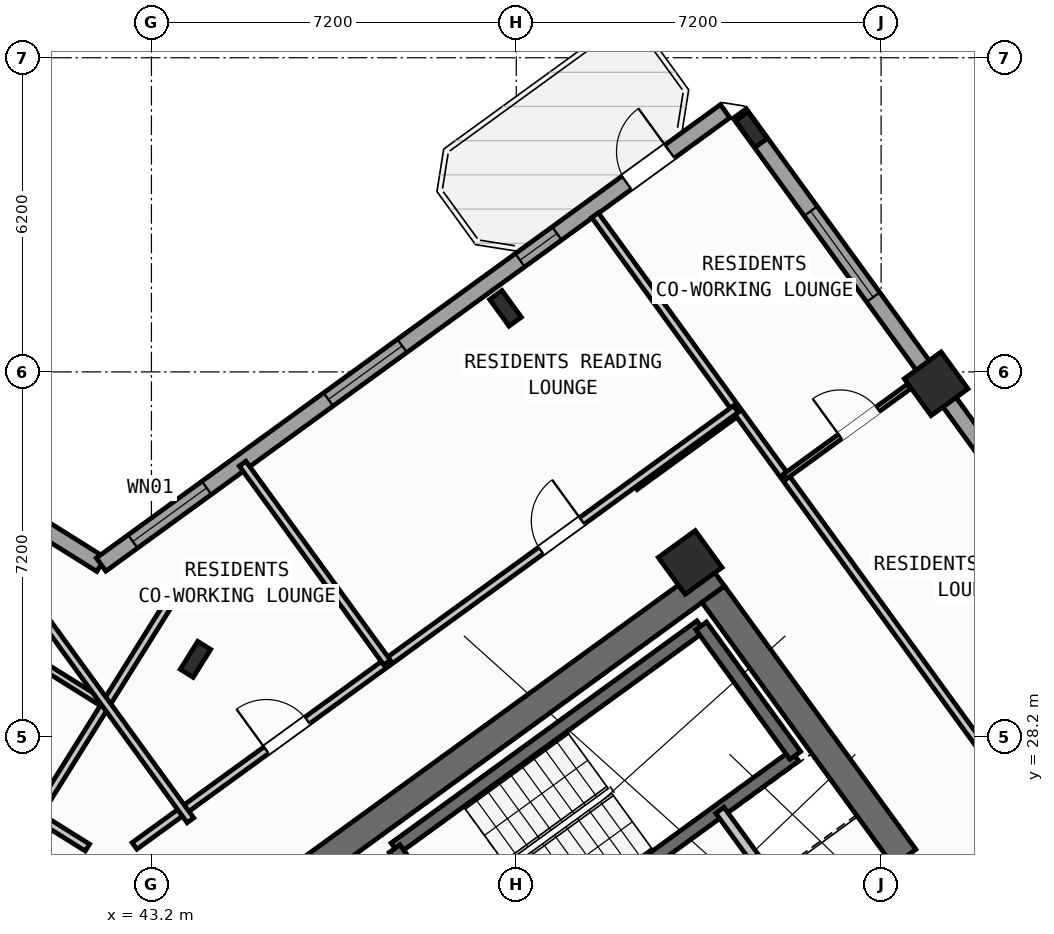
"""IFC4 building model, lengths in metres.
Left out: names, types, materials, properties, quantities, classifications, styles, units other than length and angle.
Written with IfcOpenShell. Run it as: python <this file> out.ifc"""

import sys

from ifc_helpers import new_model, si_unit, direction, frame, frame_2d, origin, origin_2d, place, context, subcontext, project, spatial, rectangle, hollow_rectangle, i_section, extrude, source, transform, mapped, element, fill, save


model = new_model("IFC4")
c1 = context("Model", 3, precision=1e-05, world=origin(), true_north=direction((0.0, 1.0)))
c2 = subcontext(c1, "Body", "Model", "MODEL_VIEW")
j1 = project(units=[si_unit("LENGTHUNIT", "METRE"), si_unit("PLANEANGLEUNIT", "RADIAN")], contexts=[c1])
p1 = place(None, origin())
s1 = spatial("IfcSite", under=j1, at=p1, CompositionType="ELEMENT")
p2 = place(p1, origin())
s2 = spatial("IfcBuilding", under=s1, at=p2, CompositionType="ELEMENT")
p3 = place(p2, frame((0.0, 0.0, 112.5)))
s3 = spatial("IfcBuildingStorey", under=s2, at=p3, CompositionType="ELEMENT", Elevation=112.5)
p4 = place(p3, frame((44.365, 24.142, 0.0), z_axis=(0.0, 0.0, 1.0), x_axis=(0.809024304885, 0.587775190107, 0.0)))
e1 = element("IfcWall", 1, at=p4, inside=s3, PredefinedType="SHEAR", context=c2, shape_type="SweptSolid", body=[
    extrude(rectangle(XDim=12.34, YDim=0.55, at=frame_2d((6.17, 0.0))), origin(), (0.0, 0.0, 1.0), 3.35),
])
p5 = place(p3, frame((58.064, 25.813, 0.0), z_axis=(0.0, 0.0, 1.0), x_axis=(-0.587764933797, 0.809031756236, 0.0)))
e2 = element("IfcWall", 2, at=p5, inside=s3, PredefinedType="SHEAR", context=c2, shape_type="SweptSolid", body=[
    extrude(rectangle(XDim=6.425, YDim=0.55, at=frame_2d((3.212, 0.0))), origin(), (0.0, 0.0, 1.0), 3.35),
])
m1 = source(origin(), c2, "Body", "SweptSolid", [
    extrude(i_section(OverallWidth=0.3, OverallDepth=0.65, WebThickness=0.016, FlangeThickness=0.031, at=origin_2d()), origin(), (0.0, 0.0, 1.0), 3.6),
])
p6 = place(p3, frame((44.068, 29.726, 0.0), z_axis=(0.0, 0.0, 1.0), x_axis=(-0.848048096156, 0.529919264233, 0.0)))
e3 = element("IfcColumn", 3, at=p6, inside=s3, PredefinedType="COLUMN", context=c2, shape_type="MappedRepresentation", body=[
    mapped(m1, transform((0.0, 0.0, 0.0), scale=1.0)),
])
m2 = source(origin(), c2, "Body", "SweptSolid", [
    extrude(hollow_rectangle(XDim=0.9, YDim=0.9, WallThickness=0.036, at=origin_2d()), origin(), (0.0, 0.0, 1.0), 3.6),
])
p7 = place(p3, frame((53.832, 31.638, 0.0), z_axis=(0.0, 0.0, 1.0), x_axis=(0.809016994375, 0.587785252292, 0.0)))
e4 = element("IfcColumn", 4, at=p7, inside=s3, PredefinedType="COLUMN", context=c2, shape_type="MappedRepresentation", body=[
    mapped(m2, transform((0.0, 0.0, 0.0), scale=1.0)),
])
p8 = place(p3, frame((50.188, 36.654, 0.0), z_axis=(0.0, 0.0, 1.0), x_axis=(0.809016994375, 0.587785252292, 0.0)))
e5 = element("IfcColumn", 5, at=p8, inside=s3, PredefinedType="COLUMN", context=c2, shape_type="MappedRepresentation", body=[
    mapped(m1, transform((0.0, 0.0, 0.0), scale=1.0)),
])
p9 = place(p3, frame((58.686, 35.165, 0.0), z_axis=(0.0, 0.0, 1.0), x_axis=(0.809016994375, 0.587785252292, 0.0)))
e6 = element("IfcColumn", 6, at=p9, inside=s3, PredefinedType="COLUMN", context=c2, shape_type="MappedRepresentation", body=[
    mapped(m2, transform((0.0, 0.0, 0.0), scale=1.0)),
])
p10 = place(p3, frame((55.042, 40.181, 0.0), z_axis=(0.0, 0.0, 1.0), x_axis=(0.809016994375, 0.587785252292, 0.0)))
e7 = element("IfcColumn", 7, at=p10, inside=s3, PredefinedType="COLUMN", context=c2, shape_type="MappedRepresentation", body=[
    mapped(m1, transform((0.0, 0.0, 0.0), scale=1.0)),
])
p11 = place(p3, frame((17.424, 47.083, 0.0), z_axis=(0.0, 0.0, 1.0), x_axis=(0.848049927979, -0.529916332693, 0.0)))
e8 = element("IfcWall", 8, at=p11, inside=s3, PredefinedType="STANDARD", context=c2, shape_type="SweptSolid", body=[
    extrude(rectangle(XDim=29.223, YDim=0.32, at=frame_2d((14.612, 0.0))), origin(), (0.0, 0.0, 1.0), 3.35),
])
p12 = place(p11, frame((3.77, 0.0, 0.0)))
e9 = element("IfcOpeningElement", 9, at=p12, cuts=e8, PredefinedType="OPENING", context=c2, shape_type="SweptSolid", body=[
    extrude(rectangle(XDim=1.05, YDim=2.15, at=frame_2d((0.525, 1.075))), frame((0.0, 0.17, 0.0), z_axis=(0.0, -1.0, 0.0), x_axis=(1.0, 0.0, 0.0)), (0.0, 0.0, 1.0), 0.34),
])
p13 = place(p11, frame((0.9, 0.0, 0.8)))
e10 = element("IfcOpeningElement", 10, at=p13, cuts=e8, PredefinedType="OPENING", context=c2, shape_type="SweptSolid", body=[
    extrude(rectangle(XDim=2.1, YDim=1.55, at=frame_2d((1.05, 0.775))), frame((0.0, 0.17, 0.0), z_axis=(0.0, -1.0, 0.0), x_axis=(1.0, 0.0, 0.0)), (0.0, 0.0, 1.0), 0.34),
])
p14 = place(p11, frame((6.972, 0.0, 1.0)))
e11 = element("IfcOpeningElement", 11, at=p14, cuts=e8, PredefinedType="OPENING", context=c2, shape_type="SweptSolid", body=[
    extrude(rectangle(XDim=0.9, YDim=1.25, at=frame_2d((0.45, 0.625))), frame((0.0, 0.17, 0.0), z_axis=(0.0, -1.0, 0.0), x_axis=(1.0, 0.0, 0.0)), (0.0, 0.0, 1.0), 0.34),
])
p15 = place(p11, frame((9.847, 0.0, 0.85)))
e12 = element("IfcOpeningElement", 12, at=p15, cuts=e8, PredefinedType="OPENING", context=c2, shape_type="SweptSolid", body=[
    extrude(rectangle(XDim=1.5, YDim=1.5, at=frame_2d((0.75, 0.75))), frame((0.0, 0.17, 0.0), z_axis=(0.0, -1.0, 0.0), x_axis=(1.0, 0.0, 0.0)), (0.0, 0.0, 1.0), 0.34),
])
p16 = place(p11, frame((13.889, 0.0, 0.95)))
e13 = element("IfcOpeningElement", 13, at=p16, cuts=e8, PredefinedType="OPENING", context=c2, shape_type="SweptSolid", body=[
    extrude(rectangle(XDim=1.2, YDim=1.4, at=frame_2d((0.6, 0.7))), frame((0.0, 0.17, 0.0), z_axis=(0.0, -1.0, 0.0), x_axis=(1.0, 0.0, 0.0)), (0.0, 0.0, 1.0), 0.34),
])
p17 = place(p11, frame((17.254, 0.0, 1.0)))
e14 = element("IfcOpeningElement", 14, at=p17, cuts=e8, PredefinedType="OPENING", context=c2, shape_type="SweptSolid", body=[
    extrude(rectangle(XDim=0.9, YDim=1.25, at=frame_2d((0.45, 0.625))), frame((0.0, 0.17, 0.0), z_axis=(0.0, -1.0, 0.0), x_axis=(1.0, 0.0, 0.0)), (0.0, 0.0, 1.0), 0.34),
])
p18 = place(p11, frame((20.764, 0.0, 0.8)))
e15 = element("IfcOpeningElement", 15, at=p18, cuts=e8, PredefinedType="OPENING", context=c2, shape_type="SweptSolid", body=[
    extrude(rectangle(XDim=2.1, YDim=1.55, at=frame_2d((1.05, 0.775))), frame((0.0, 0.17, 0.0), z_axis=(0.0, -1.0, 0.0), x_axis=(1.0, 0.0, 0.0)), (0.0, 0.0, 1.0), 0.34),
])
p19 = place(p11, frame((25.403, 0.0, 0.8)))
e16 = element("IfcOpeningElement", 16, at=p19, cuts=e8, PredefinedType="OPENING", context=c2, shape_type="SweptSolid", body=[
    extrude(rectangle(XDim=2.1, YDim=1.55, at=frame_2d((1.05, 0.775))), frame((0.0, 0.17, 0.0), z_axis=(0.0, -1.0, 0.0), x_axis=(1.0, 0.0, 0.0)), (0.0, 0.0, 1.0), 0.34),
])
p20 = place(p3, frame((42.207, 31.597, 0.0), z_axis=(0.0, 0.0, 1.0), x_axis=(0.809020333377, 0.587780656523, 0.0)))
e17 = element("IfcWall", 17, at=p20, inside=s3, PredefinedType="STANDARD", context=c2, shape_type="SweptSolid", body=[
    extrude(rectangle(XDim=15.223, YDim=0.32, at=frame_2d((7.611, 0.0))), origin(), (0.0, 0.0, 1.0), 3.35),
])
p21 = place(p20, frame((12.82, 0.0, 0.0)))
e18 = element("IfcOpeningElement", 18, at=p21, cuts=e17, PredefinedType="OPENING", context=c2, shape_type="SweptSolid", body=[
    extrude(rectangle(XDim=1.05, YDim=2.15, at=frame_2d((0.525, 1.075))), frame((0.0, 0.17, 0.0), z_axis=(0.0, -1.0, 0.0), x_axis=(1.0, 0.0, 0.0)), (0.0, 0.0, 1.0), 0.34),
])
p22 = place(p20, frame((0.775, 0.0, 0.85)))
e19 = element("IfcOpeningElement", 19, at=p22, cuts=e17, PredefinedType="OPENING", context=c2, shape_type="SweptSolid", body=[
    extrude(rectangle(XDim=1.8, YDim=1.5, at=frame_2d((0.9, 0.75))), frame((0.0, 0.17, 0.0), z_axis=(0.0, -1.0, 0.0), x_axis=(1.0, 0.0, 0.0)), (0.0, 0.0, 1.0), 0.34),
])
p23 = place(p20, frame((5.544, 0.0, 0.85)))
e20 = element("IfcOpeningElement", 20, at=p23, cuts=e17, PredefinedType="OPENING", context=c2, shape_type="SweptSolid", body=[
    extrude(rectangle(XDim=1.8, YDim=1.5, at=frame_2d((0.9, 0.75))), frame((0.0, 0.17, 0.0), z_axis=(0.0, -1.0, 0.0), x_axis=(1.0, 0.0, 0.0)), (0.0, 0.0, 1.0), 0.34),
])
p24 = place(p20, frame((10.219, 0.0, 1.0)))
e21 = element("IfcOpeningElement", 21, at=p24, cuts=e17, PredefinedType="OPENING", context=c2, shape_type="SweptSolid", body=[
    extrude(rectangle(XDim=0.9, YDim=1.25, at=frame_2d((0.45, 0.625))), frame((0.0, 0.17, 0.0), z_axis=(0.0, -1.0, 0.0), x_axis=(1.0, 0.0, 0.0)), (0.0, 0.0, 1.0), 0.34),
])
p25 = place(p3, frame((54.81, 40.5, 0.0), z_axis=(0.0, 0.0, 1.0), x_axis=(0.587783625747, -0.809018176127, 0.0)))
e22 = element("IfcWall", 22, at=p25, inside=s3, PredefinedType="STANDARD", context=c2, shape_type="SweptSolid", body=[
    extrude(rectangle(XDim=21.587, YDim=0.32, at=frame_2d((10.794, 0.0))), origin(), (0.0, 0.0, 1.0), 2.775),
])
p26 = place(p25, frame((2.381, 0.0, 0.8)))
e23 = element("IfcOpeningElement", 23, at=p26, cuts=e22, PredefinedType="OPENING", context=c2, shape_type="SweptSolid", body=[
    extrude(rectangle(XDim=2.1, YDim=1.55, at=frame_2d((1.05, 0.775))), frame((0.0, 0.17, 0.0), z_axis=(0.0, -1.0, 0.0), x_axis=(1.0, 0.0, 0.0)), (0.0, 0.0, 1.0), 0.34),
])
p27 = place(p25, frame((9.344, 0.0, 0.85)))
e24 = element("IfcOpeningElement", 24, at=p27, cuts=e22, PredefinedType="OPENING", context=c2, shape_type="SweptSolid", body=[
    extrude(rectangle(XDim=1.8, YDim=1.5, at=frame_2d((0.9, 0.75))), frame((0.0, 0.17, 0.0), z_axis=(0.0, -1.0, 0.0), x_axis=(1.0, 0.0, 0.0)), (0.0, 0.0, 1.0), 0.34),
])
p28 = place(p25, frame((19.234, 0.0, 1.0)))
e25 = element("IfcOpeningElement", 25, at=p28, cuts=e22, PredefinedType="OPENING", context=c2, shape_type="SweptSolid", body=[
    extrude(rectangle(XDim=0.9, YDim=1.25, at=frame_2d((0.45, 0.625))), frame((0.0, 0.17, 0.0), z_axis=(0.0, -1.0, 0.0), x_axis=(1.0, 0.0, 0.0)), (0.0, 0.0, 1.0), 0.34),
])
p29 = place(p3, frame((48.006, 25.996, 0.0), z_axis=(0.0, 0.0, 1.0), x_axis=(0.80901903764, 0.587782439969, 0.0)))
e26 = element("IfcWall", 26, at=p29, inside=s3, PredefinedType="SHEAR", context=c2, shape_type="SweptSolid", body=[
    extrude(rectangle(XDim=7.46, YDim=0.26, at=frame_2d((3.73, 0.0))), origin(), (0.0, 0.0, 1.0), 3.35),
])
p30 = place(p3, frame((49.863, 23.44, 0.0), z_axis=(0.0, 0.0, 1.0), x_axis=(0.809003474932, 0.587803859759, 0.0)))
e27 = element("IfcWall", 27, at=p30, inside=s3, PredefinedType="SHEAR", context=c2, shape_type="SweptSolid", body=[
    extrude(rectangle(XDim=7.46, YDim=0.26, at=frame_2d((3.73, 0.0))), origin(), (0.0, 0.0, 1.0), 3.35),
])
p31 = place(p30, frame((0.36, 0.0, 0.0)))
e28 = element("IfcOpeningElement", 28, at=p31, cuts=e27, PredefinedType="OPENING", context=c2, shape_type="SweptSolid", body=[
    extrude(rectangle(XDim=0.86, YDim=2.05, at=frame_2d((0.43, 1.025))), frame((0.0, 0.14, 0.0), z_axis=(0.0, -1.0, 0.0), x_axis=(1.0, 0.0, 0.0)), (0.0, 0.0, 1.0), 0.28),
])
p32 = place(p3, frame((49.855, 23.434, 0.0), z_axis=(0.0, 0.0, 1.0), x_axis=(-0.58776738483, 0.809029975545, 0.0)))
e29 = element("IfcWall", 29, at=p32, inside=s3, PredefinedType="SHEAR", context=c2, shape_type="SweptSolid", body=[
    extrude(rectangle(XDim=3.16, YDim=0.26, at=frame_2d((1.58, 0.0))), origin(), (0.0, 0.0, 1.0), 3.35),
])
p33 = place(p3, frame((55.906, 27.831, 0.0), z_axis=(0.0, 0.0, 1.0), x_axis=(-0.587804123638, 0.809003283204, 0.0)))
e30 = element("IfcWall", 30, at=p33, inside=s3, PredefinedType="SHEAR", context=c2, shape_type="SweptSolid", body=[
    extrude(rectangle(XDim=3.16, YDim=0.26, at=frame_2d((1.58, 0.0))), origin(), (0.0, 0.0, 1.0), 3.35),
])
p34 = place(p3, frame((56.111, 24.419, 0.0), z_axis=(0.0, 0.0, 1.0), x_axis=(-0.58777848983, 0.809021907548, 0.0)))
e31 = element("IfcWall", 31, at=p34, inside=s3, PredefinedType="STANDARD", context=c2, shape_type="SweptSolid", body=[
    extrude(rectangle(XDim=2.88, YDim=0.2, at=frame_2d((1.44, 0.0))), origin(), (0.0, 0.0, 1.0), 3.34),
])
p35 = place(p3, frame((41.936, 26.012, 0.0), z_axis=(0.0, 0.0, 1.0), x_axis=(-0.848051154596, 0.529914369676, 0.0)))
e32 = element("IfcWall", 32, at=p35, inside=s3, PredefinedType="PARTITIONING", context=c2, shape_type="SweptSolid", body=[
    extrude(rectangle(XDim=15.57, YDim=0.16, at=frame_2d((7.785, 0.0))), origin(), (0.0, 0.0, 1.0), 3.34),
])
p36 = place(p35, frame((10.83, 0.0, 0.0)))
e33 = element("IfcOpeningElement", 33, at=p36, cuts=e32, PredefinedType="OPENING", context=c2, shape_type="SweptSolid", body=[
    extrude(rectangle(XDim=1.0, YDim=2.1, at=frame_2d((0.5, 1.05))), frame((0.0, 0.09, 0.0), z_axis=(0.0, -1.0, 0.0), x_axis=(1.0, 0.0, 0.0)), (0.0, 0.0, 1.0), 0.18),
])
p37 = place(p3, frame((43.704, 31.086, 0.0), z_axis=(0.0, 0.0, 1.0), x_axis=(-0.529906828443, -0.848055866774, 0.0)))
e34 = element("IfcWall", 34, at=p37, inside=s3, PredefinedType="PARTITIONING", context=c2, shape_type="SweptSolid", body=[
    extrude(rectangle(XDim=5.48, YDim=0.16, at=frame_2d((2.74, 0.0))), origin(), (0.0, 0.0, 1.0), 3.34),
])
p38 = place(p3, frame((42.226, 28.873, 0.0), z_axis=(0.0, 0.0, 1.0), x_axis=(-0.848049134363, 0.529917602752, 0.0)))
e35 = element("IfcWall", 35, at=p38, inside=s3, PredefinedType="PLUMBINGWALL", context=c2, shape_type="SweptSolid", body=[
    extrude(rectangle(XDim=14.3, YDim=0.14, at=frame_2d((7.15, 0.0))), origin(), (0.0, 0.0, 1.0), 3.34),
])
p39 = place(p38, frame((9.57, 0.0, 0.0)))
e36 = element("IfcOpeningElement", 36, at=p39, cuts=e35, PredefinedType="OPENING", context=c2, shape_type="SweptSolid", body=[
    extrude(rectangle(XDim=0.92, YDim=2.08, at=frame_2d((0.46, 1.04))), frame((0.0, 0.08, 0.0), z_axis=(0.0, -1.0, 0.0), x_axis=(1.0, 0.0, 0.0)), (0.0, 0.0, 1.0), 0.16),
])
p40 = place(p3, frame((52.739, 33.143, 0.0), z_axis=(0.0, 0.0, 1.0), x_axis=(0.809000999347, 0.58780726693, 0.0)))
e37 = element("IfcWall", 37, at=p40, inside=s3, PredefinedType="PARTITIONING", context=c2, shape_type="SweptSolid", body=[
    extrude(rectangle(XDim=2.51, YDim=0.16, at=frame_2d((1.255, 0.0))), origin(), (0.0, 0.0, 1.0), 3.34),
])
p41 = place(p3, frame((61.564, 25.266, 0.0), z_axis=(0.0, 0.0, 1.0), x_axis=(-0.587784527444, 0.809017521007, 0.0)))
e38 = element("IfcWall", 38, at=p41, inside=s3, PredefinedType="PARTITIONING", context=c2, shape_type="SweptSolid", body=[
    extrude(rectangle(XDim=16.35, YDim=0.16, at=frame_2d((8.175, 0.0))), origin(), (0.0, 0.0, 1.0), 3.34),
])
p42 = place(p3, frame((55.703, 33.334, 0.0), z_axis=(0.0, 0.0, 1.0), x_axis=(0.809021891479, 0.587778511948, 0.0)))
e39 = element("IfcWall", 39, at=p42, inside=s3, PredefinedType="PARTITIONING", context=c2, shape_type="SweptSolid", body=[
    extrude(rectangle(XDim=3.028, YDim=0.11, at=frame_2d((1.514, 0.0))), origin(), (0.0, 0.0, 1.0), 2.775),
])
p43 = place(p42, frame((1.345, 0.0, 0.0)))
e40 = element("IfcOpeningElement", 40, at=p43, cuts=e39, PredefinedType="OPENING", context=c2, shape_type="SweptSolid", body=[
    extrude(rectangle(XDim=0.92, YDim=2.08, at=frame_2d((0.46, 1.04))), frame((0.0, 0.065, 0.0), z_axis=(0.0, -1.0, 0.0), x_axis=(1.0, 0.0, 0.0)), (0.0, 0.0, 1.0), 0.13),
])
p44 = place(p3, frame((42.866, 26.044, 0.0), z_axis=(0.0, 0.0, 1.0), x_axis=(0.809020254154, 0.587780765566, 0.0)))
e41 = element("IfcWall", 41, at=p44, inside=s3, PredefinedType="PARTITIONING", context=c2, shape_type="SweptSolid", body=[
    extrude(rectangle(XDim=14.67, YDim=0.16, at=frame_2d((7.335, 0.0))), origin(), (0.0, 0.0, 1.0), 3.34),
])
p45 = place(p44, frame((3.215, 0.0, 0.0)))
e42 = element("IfcOpeningElement", 42, at=p45, cuts=e41, PredefinedType="OPENING", context=c2, shape_type="SweptSolid", body=[
    extrude(rectangle(XDim=1.0, YDim=2.1, at=frame_2d((0.5, 1.05))), frame((0.0, 0.09, 0.0), z_axis=(0.0, -1.0, 0.0), x_axis=(1.0, 0.0, 0.0)), (0.0, 0.0, 1.0), 0.18),
])
p46 = place(p44, frame((9.915, 0.0, 0.0)))
e43 = element("IfcOpeningElement", 43, at=p46, cuts=e41, PredefinedType="OPENING", context=c2, shape_type="SweptSolid", body=[
    extrude(rectangle(XDim=1.0, YDim=2.1, at=frame_2d((0.5, 1.05))), frame((0.0, 0.09, 0.0), z_axis=(0.0, -1.0, 0.0), x_axis=(1.0, 0.0, 0.0)), (0.0, 0.0, 1.0), 0.18),
])
p47 = place(p3, frame((43.969, 26.55, 0.0), z_axis=(0.0, 0.0, 1.0), x_axis=(-0.587776919386, 0.80902304852, 0.0)))
e44 = element("IfcWall", 44, at=p47, inside=s3, PredefinedType="PARTITIONING", context=c2, shape_type="SweptSolid", body=[
    extrude(rectangle(XDim=5.48, YDim=0.16, at=frame_2d((2.74, 0.0))), origin(), (0.0, 0.0, 1.0), 3.34),
])
p48 = place(p3, frame((47.849, 29.665, 0.0), z_axis=(0.0, 0.0, 1.0), x_axis=(-0.587785532001, 0.809016791155, 0.0)))
e45 = element("IfcWall", 45, at=p48, inside=s3, PredefinedType="PARTITIONING", context=c2, shape_type="SweptSolid", body=[
    extrude(rectangle(XDim=4.85, YDim=0.16, at=frame_2d((2.425, 0.0))), origin(), (0.0, 0.0, 1.0), 3.34),
])
m3 = source(origin(), c2, "Body", "SweptSolid", [
    extrude(rectangle(XDim=1.05, YDim=2.15, at=frame_2d((0.525, 1.075))), frame((0.0, 0.025, 0.0), z_axis=(0.0, -1.0, 0.0), x_axis=(1.0, 0.0, 0.0)), (0.0, 0.0, 1.0), 0.05),
])
p49 = place(p21, origin())
e46 = element("IfcDoor", 46, at=p49, inside=s3, OperationType="SINGLE_SWING_RIGHT", PredefinedType="DOOR", context=c2, shape_type="MappedRepresentation", body=[
    mapped(m3, transform((0.0, 0.0, 0.0), scale=1.0)),
])
fill(e18, e46)
m4 = source(origin(), c2, "Body", "SweptSolid", [
    extrude(rectangle(XDim=1.8, YDim=1.5, at=frame_2d((0.9, 0.75))), frame((0.0, 0.03, 0.0), z_axis=(0.0, -1.0, 0.0), x_axis=(1.0, 0.0, 0.0)), (0.0, 0.0, 1.0), 0.06),
])
p50 = place(p22, origin())
e47 = element("IfcWindow", 47, at=p50, inside=s3, PartitioningType="SINGLE_PANEL", PredefinedType="WINDOW", context=c2, shape_type="MappedRepresentation", body=[
    mapped(m4, transform((0.0, 0.0, 0.0), scale=1.0)),
])
fill(e19, e47)
p51 = place(p23, origin())
e48 = element("IfcWindow", 48, at=p51, inside=s3, PartitioningType="SINGLE_PANEL", PredefinedType="WINDOW", context=c2, shape_type="MappedRepresentation", body=[
    mapped(m4, transform((0.0, 0.0, 0.0), scale=1.0)),
])
fill(e20, e48)
m5 = source(origin(), c2, "Body", "SweptSolid", [
    extrude(rectangle(XDim=0.9, YDim=1.25, at=frame_2d((0.45, 0.625))), frame((0.0, 0.03, 0.0), z_axis=(0.0, -1.0, 0.0), x_axis=(1.0, 0.0, 0.0)), (0.0, 0.0, 1.0), 0.06),
])
p52 = place(p24, origin())
e49 = element("IfcWindow", 49, at=p52, inside=s3, PartitioningType="SINGLE_PANEL", PredefinedType="WINDOW", context=c2, shape_type="MappedRepresentation", body=[
    mapped(m5, transform((0.0, 0.0, 0.0), scale=1.0)),
])
fill(e21, e49)
m6 = source(origin(), c2, "Body", "SweptSolid", [
    extrude(rectangle(XDim=2.1, YDim=1.55, at=frame_2d((1.05, 0.775))), frame((0.0, 0.03, 0.0), z_axis=(0.0, -1.0, 0.0), x_axis=(1.0, 0.0, 0.0)), (0.0, 0.0, 1.0), 0.06),
])
p53 = place(p26, origin())
e50 = element("IfcWindow", 50, at=p53, inside=s3, PartitioningType="SINGLE_PANEL", PredefinedType="WINDOW", context=c2, shape_type="MappedRepresentation", body=[
    mapped(m6, transform((0.0, 0.0, 0.0), scale=1.0)),
])
fill(e23, e50)
m7 = source(origin(), c2, "Body", "SweptSolid", [
    extrude(rectangle(XDim=0.92, YDim=2.08, at=frame_2d((0.46, 1.04))), frame((0.0, 0.025, 0.0), z_axis=(0.0, -1.0, 0.0), x_axis=(1.0, 0.0, 0.0)), (0.0, 0.0, 1.0), 0.05),
])
p54 = place(p43, origin())
e51 = element("IfcDoor", 51, at=p54, inside=s3, OperationType="SINGLE_SWING_LEFT", PredefinedType="DOOR", context=c2, shape_type="MappedRepresentation", body=[
    mapped(m7, transform((0.0, 0.0, 0.0), scale=1.0)),
])
fill(e40, e51)
m8 = source(origin(), c2, "Body", "SweptSolid", [
    extrude(rectangle(XDim=1.0, YDim=2.1, at=frame_2d((0.5, 1.05))), frame((0.0, 0.025, 0.0), z_axis=(0.0, -1.0, 0.0), x_axis=(1.0, 0.0, 0.0)), (0.0, 0.0, 1.0), 0.05),
])
p55 = place(p45, origin())
e52 = element("IfcDoor", 52, at=p55, inside=s3, OperationType="SINGLE_SWING_LEFT", PredefinedType="DOOR", context=c2, shape_type="MappedRepresentation", body=[
    mapped(m8, transform((0.0, 0.0, 0.0), scale=1.0)),
])
fill(e42, e52)
p56 = place(p46, origin())
e53 = element("IfcDoor", 53, at=p56, inside=s3, OperationType="SINGLE_SWING_RIGHT", PredefinedType="DOOR", context=c2, shape_type="MappedRepresentation", body=[
    mapped(m8, transform((0.0, 0.0, 0.0), scale=1.0)),
])
fill(e43, e53)
save(model, sys.argv[1])
